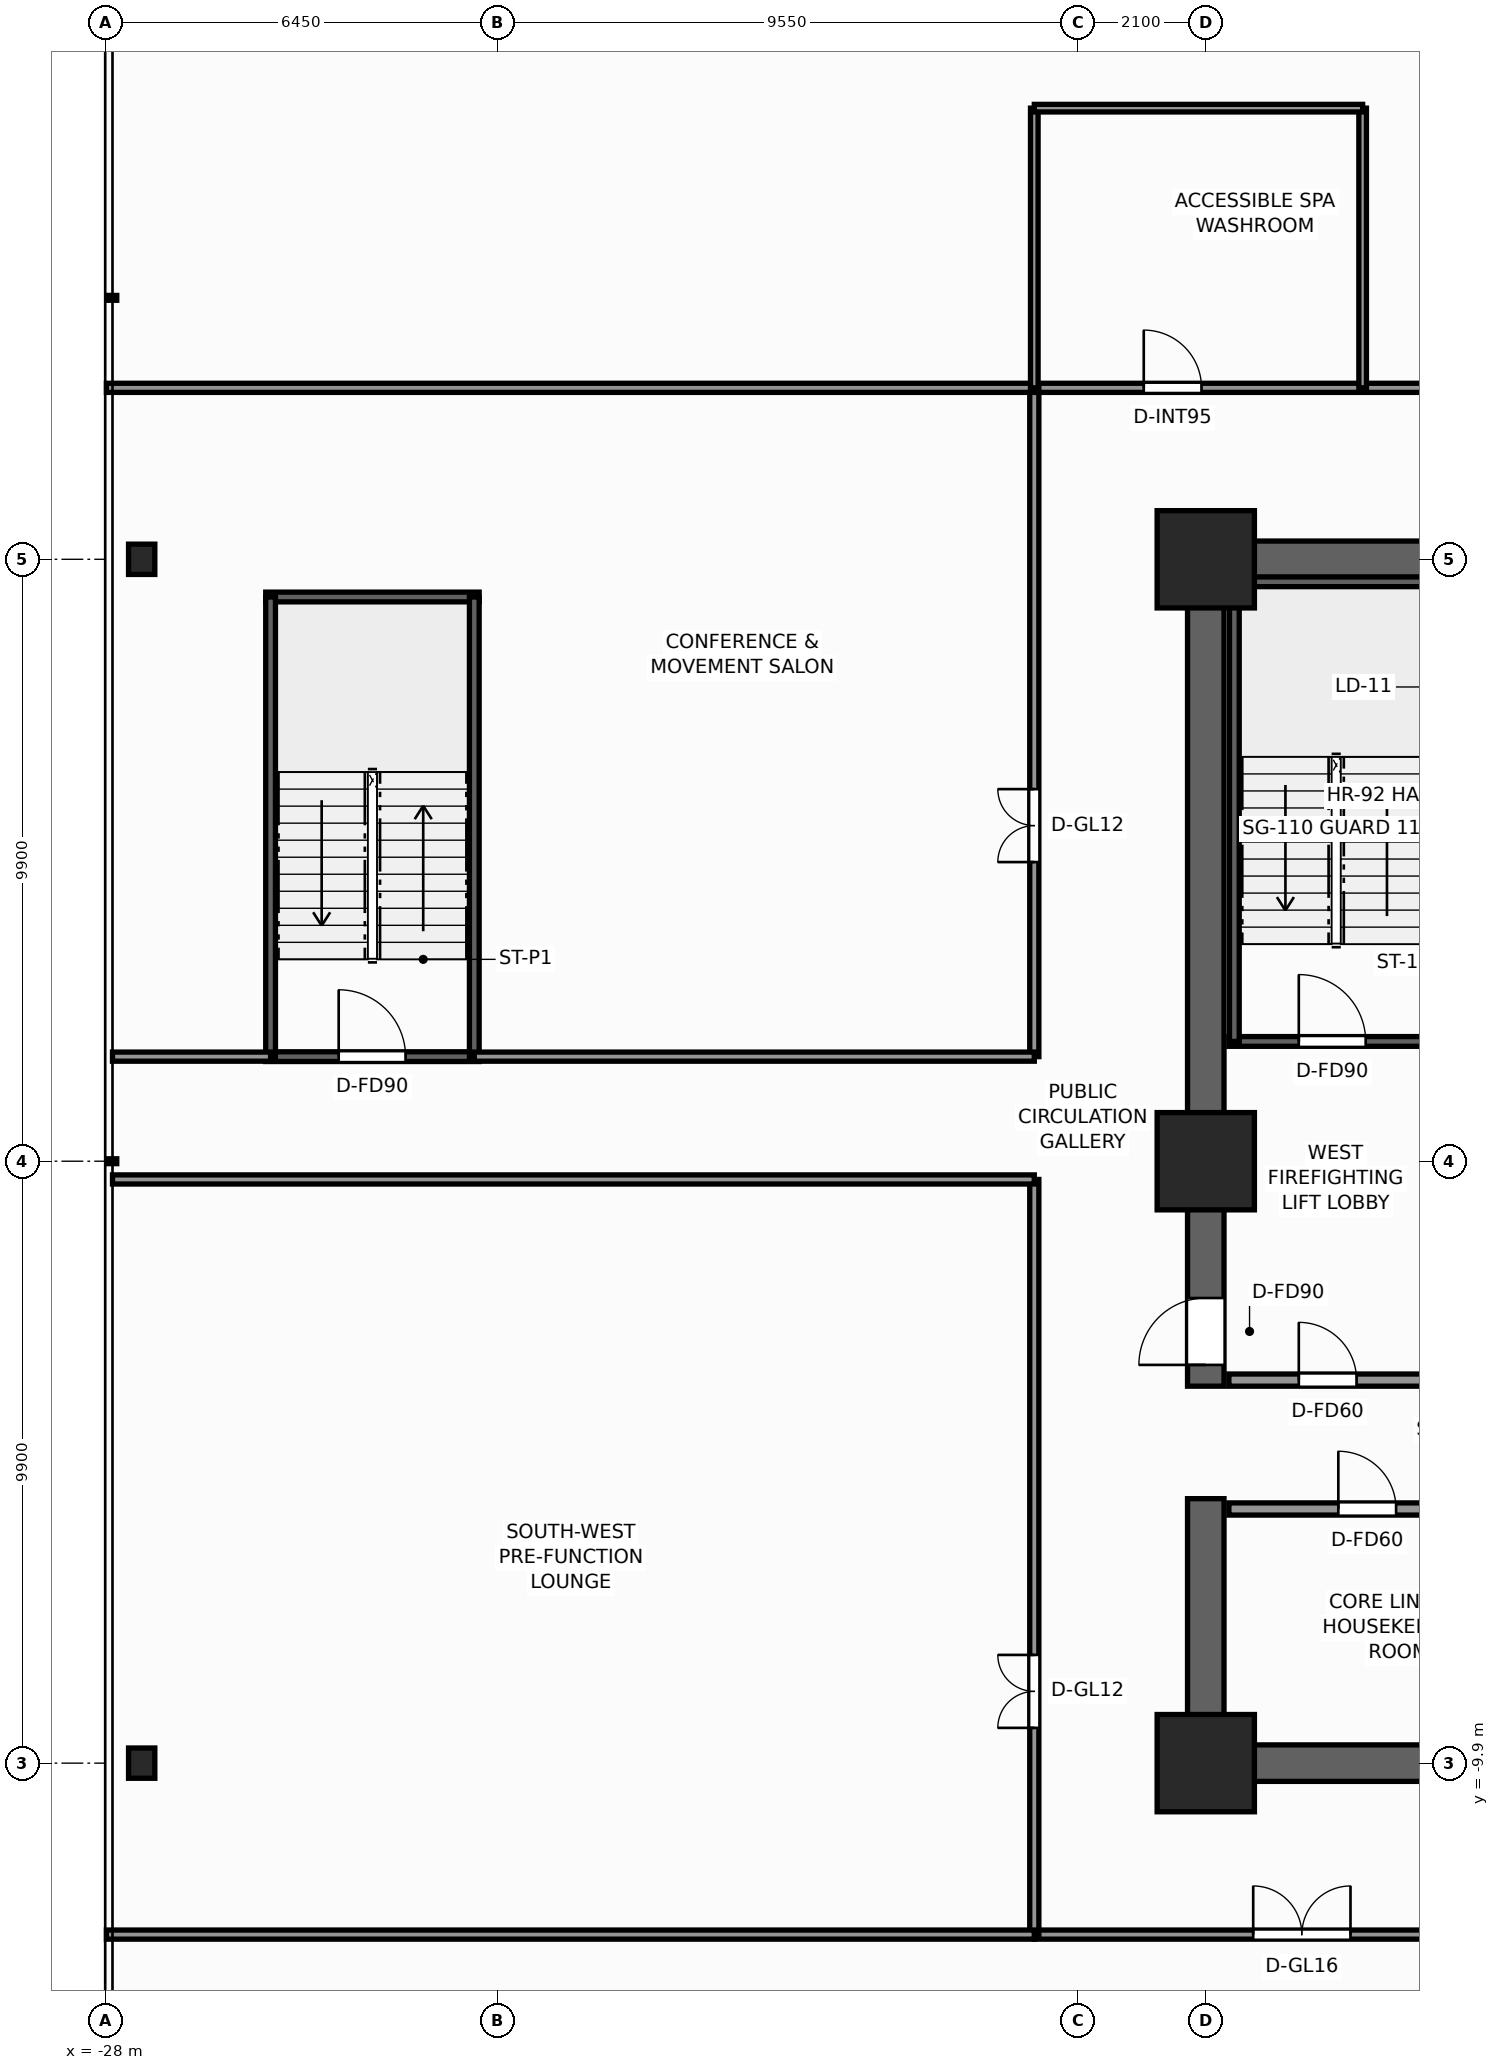
"""IFC4 building model, lengths in metres.
Left out: names, types, materials, properties, quantities, classifications, styles, units other than length and angle.
Written with IfcOpenShell. Run it as: python <this file> out.ifc"""

import sys

from ifc_helpers import new_model, si_unit, direction, frame, frame_2d, origin, origin_2d, place, context, subcontext, project, spatial, rectangle, i_section, extrude, element, fill, save


model = new_model("IFC4")
c1 = context("Model", 3, precision=1e-05, world=origin(), true_north=direction((0.0, 1.0)))
c2 = subcontext(c1, "Body", "Model", "MODEL_VIEW")
j1 = project(units=[si_unit("LENGTHUNIT", "METRE"), si_unit("PLANEANGLEUNIT", "RADIAN")], contexts=[c1])
p1 = place(None, origin())
s1 = spatial("IfcSite", under=j1, at=p1, CompositionType="ELEMENT")
p2 = place(p1, origin())
s2 = spatial("IfcBuilding", under=s1, at=p2, CompositionType="ELEMENT")
p3 = place(p2, frame((0.0, 0.0, 15.2)))
s3 = spatial("IfcBuildingStorey", under=s2, at=p3, CompositionType="ELEMENT", Elevation=15.2)
p4 = place(p3, frame((-3.54, -9.9, 0.0), z_axis=(0.0, 0.0, 1.0), x_axis=(-1.0, 0.0, 0.0)))
e1 = element("IfcWall", 1, at=p4, inside=s3, PredefinedType="SHEAR", context=c2, shape_type="SweptSolid", body=[
    extrude(rectangle(XDim=6.66, YDim=0.6, at=frame_2d((3.33, 0.0))), origin(), (0.0, 0.0, 1.0), 4.1),
])
p5 = place(p3, frame((-10.2, 9.9, 0.0), z_axis=(0.0, 0.0, 1.0), x_axis=(1.0, 0.0, 0.0)))
e2 = element("IfcWall", 2, at=p5, inside=s3, PredefinedType="SHEAR", context=c2, shape_type="SweptSolid", body=[
    extrude(rectangle(XDim=14.62, YDim=0.6, at=frame_2d((7.31, 0.0))), origin(), (0.0, 0.0, 1.0), 4.1),
])
p6 = place(p3, frame((-9.9, -9.6, 0.0), z_axis=(0.0, 0.0, 1.0), x_axis=(0.0, 1.0, 0.0)))
e3 = element("IfcWall", 3, at=p6, inside=s3, PredefinedType="SHEAR", context=c2, shape_type="SweptSolid", body=[
    extrude(rectangle(XDim=4.05, YDim=0.6, at=frame_2d((2.025, 0.0))), origin(), (0.0, 0.0, 1.0), 4.1),
])
p7 = place(p3, frame((-9.9, -3.7, 0.0), z_axis=(0.0, 0.0, 1.0), x_axis=(0.0, 1.0, 0.0)))
e4 = element("IfcWall", 4, at=p7, inside=s3, PredefinedType="SHEAR", context=c2, shape_type="SweptSolid", body=[
    extrude(rectangle(XDim=13.3, YDim=0.6, at=frame_2d((6.65, 0.0))), origin(), (0.0, 0.0, 1.0), 4.1),
])
p8 = place(p7, frame((0.35, 0.0, 0.0)))
e5 = element("IfcOpeningElement", 5, at=p8, cuts=e4, PredefinedType="OPENING", context=c2, shape_type="SweptSolid", body=[
    extrude(rectangle(XDim=1.1, YDim=2.2, at=frame_2d((0.55, 1.1))), frame((0.0, 0.31, 0.0), z_axis=(0.0, -1.0, 0.0), x_axis=(1.0, 0.0, 0.0)), (0.0, 0.0, 1.0), 0.62),
])
for number, where, z_axis, x_axis in (
    (6, (-9.9, -9.9, 0.0), (0.0, 0.0, 1.0), (1.0, 0.0, 0.0)),
    (7, (-9.9, 9.9, 0.0), (0.0, 0.0, 1.0), (1.0, 0.0, 0.0)),
    (8, (-9.9, 0.0, 0.0), (0.0, 0.0, 1.0), (1.0, 0.0, 0.0)),
):
    element("IfcColumn", number, at=place(p3, frame(where, z_axis=z_axis, x_axis=x_axis)), inside=s3, PredefinedType="COLUMN", context=c2, shape_type="SweptSolid", body=[
        extrude(rectangle(XDim=1.6, YDim=1.6, at=origin_2d()), origin(), (0.0, 0.0, 1.0), 4.1),
    ])
for number, where, z_axis, x_axis in (
    (9, (-27.4, -9.9, 0.0), (0.0, 0.0, 1.0), (1.0, 0.0, 0.0)),
    (10, (-27.4, 9.9, 0.0), (0.0, 0.0, 1.0), (1.0, 0.0, 0.0)),
):
    element("IfcColumn", number, at=place(p3, frame(where, z_axis=z_axis, x_axis=x_axis)), inside=s3, PredefinedType="COLUMN", context=c2, shape_type="SweptSolid", body=[
        extrude(i_section(OverallWidth=0.432, OverallDepth=0.498, WebThickness=0.056, FlangeThickness=0.089, FilletRadius=0.025, at=origin_2d()), origin(), (0.0, 0.0, 1.0), 4.1),
    ])
p9 = place(p3, frame((-9.52, 1.97, 0.0), z_axis=(0.0, 0.0, 1.0), x_axis=(1.0, 0.0, 0.0)))
e11 = element("IfcWall", 11, at=p9, inside=s3, PredefinedType="SHEAR", context=c2, shape_type="SweptSolid", body=[
    extrude(rectangle(XDim=3.52, YDim=0.16, at=frame_2d((1.76, 0.0))), origin(), (0.0, 0.0, 1.0), 4.1),
])
p10 = place(p9, frame((1.15, 0.0, 0.0)))
e12 = element("IfcOpeningElement", 12, at=p10, cuts=e11, PredefinedType="OPENING", context=c2, shape_type="SweptSolid", body=[
    extrude(rectangle(XDim=1.1, YDim=2.2, at=frame_2d((0.55, 1.1))), frame((0.0, 0.09, 0.0), z_axis=(0.0, -1.0, 0.0), x_axis=(1.0, 0.0, 0.0)), (0.0, 0.0, 1.0), 0.18),
])
p11 = place(p3, frame((-9.52, 9.53, 0.0), z_axis=(0.0, 0.0, 1.0), x_axis=(1.0, 0.0, 0.0)))
e13 = element("IfcWall", 13, at=p11, inside=s3, PredefinedType="SHEAR", context=c2, shape_type="SweptSolid", body=[
    extrude(rectangle(XDim=3.52, YDim=0.16, at=frame_2d((1.76, 0.0))), origin(), (0.0, 0.0, 1.0), 4.1),
])
p12 = place(p3, frame((-9.43, 1.97, 0.0), z_axis=(0.0, 0.0, 1.0), x_axis=(0.0, 1.0, 0.0)))
e14 = element("IfcWall", 14, at=p12, inside=s3, PredefinedType="SHEAR", context=c2, shape_type="SweptSolid", body=[
    extrude(rectangle(XDim=7.56, YDim=0.16, at=frame_2d((3.78, 0.0))), origin(), (0.0, 0.0, 1.0), 4.1),
])
p13 = place(p3, frame((-9.52, -3.6, 0.0), z_axis=(0.0, 0.0, 1.0), x_axis=(1.0, 0.0, 0.0)))
e15 = element("IfcWall", 15, at=p13, inside=s3, PredefinedType="SOLIDWALL", context=c2, shape_type="SweptSolid", body=[
    extrude(rectangle(XDim=3.77, YDim=0.2, at=frame_2d((1.885, 0.0))), origin(), (0.0, 0.0, 1.0), 3.7),
])
p14 = place(p13, frame((1.15, 0.0, 0.0)))
e16 = element("IfcOpeningElement", 16, at=p14, cuts=e15, PredefinedType="OPENING", context=c2, shape_type="SweptSolid", body=[
    extrude(rectangle(XDim=0.95, YDim=2.06, at=frame_2d((0.475, 1.03))), frame((0.0, 0.11, 0.0), z_axis=(0.0, -1.0, 0.0), x_axis=(1.0, 0.0, 0.0)), (0.0, 0.0, 1.0), 0.22),
])
p15 = place(p3, frame((-9.52, -5.72, 0.0), z_axis=(0.0, 0.0, 1.0), x_axis=(1.0, 0.0, 0.0)))
e17 = element("IfcWall", 17, at=p15, inside=s3, PredefinedType="SOLIDWALL", context=c2, shape_type="SweptSolid", body=[
    extrude(rectangle(XDim=5.66, YDim=0.2, at=frame_2d((2.83, 0.0))), origin(), (0.0, 0.0, 1.0), 3.7),
])
p16 = place(p15, frame((1.8, 0.0, 0.0)))
e18 = element("IfcOpeningElement", 18, at=p16, cuts=e17, PredefinedType="OPENING", context=c2, shape_type="SweptSolid", body=[
    extrude(rectangle(XDim=0.95, YDim=2.06, at=frame_2d((0.475, 1.03))), frame((0.0, 0.11, 0.0), z_axis=(0.0, -1.0, 0.0), x_axis=(1.0, 0.0, 0.0)), (0.0, 0.0, 1.0), 0.22),
])
p17 = place(p3, frame((-25.36, 1.72, 0.0), z_axis=(0.0, 0.0, 1.0), x_axis=(1.0, 0.0, 0.0)))
e19 = element("IfcWall", 19, at=p17, inside=s3, PredefinedType="SHEAR", context=c2, shape_type="SweptSolid", body=[
    extrude(rectangle(XDim=3.51, YDim=0.16, at=frame_2d((1.755, 0.0))), origin(), (0.0, 0.0, 1.0), 4.1),
])
p18 = place(p17, frame((1.2, 0.0, 0.0)))
e20 = element("IfcOpeningElement", 20, at=p18, cuts=e19, PredefinedType="OPENING", context=c2, shape_type="SweptSolid", body=[
    extrude(rectangle(XDim=1.1, YDim=2.2, at=frame_2d((0.55, 1.1))), frame((0.0, 0.09, 0.0), z_axis=(0.0, -1.0, 0.0), x_axis=(1.0, 0.0, 0.0)), (0.0, 0.0, 1.0), 0.18),
])
p19 = place(p3, frame((-25.36, 9.28, 0.0), z_axis=(0.0, 0.0, 1.0), x_axis=(1.0, 0.0, 0.0)))
e21 = element("IfcWall", 21, at=p19, inside=s3, PredefinedType="SHEAR", context=c2, shape_type="SweptSolid", body=[
    extrude(rectangle(XDim=3.51, YDim=0.16, at=frame_2d((1.755, 0.0))), origin(), (0.0, 0.0, 1.0), 4.1),
])
for number, where, z_axis, x_axis in (
    (22, (-25.28, 1.72, 0.0), (0.0, 0.0, 1.0), (0.0, 1.0, 0.0)),
    (23, (-21.93, 1.72, 0.0), (0.0, 0.0, 1.0), (0.0, 1.0, 0.0)),
):
    element("IfcWall", number, at=place(p3, frame(where, z_axis=z_axis, x_axis=x_axis)), inside=s3, PredefinedType="SHEAR", context=c2, shape_type="SweptSolid", body=[
        extrude(rectangle(XDim=7.56, YDim=0.16, at=frame_2d((3.78, 0.0))), origin(), (0.0, 0.0, 1.0), 4.1),
    ])
p20 = place(p3, frame((-12.72, -12.72, 0.0), z_axis=(0.0, 0.0, 1.0), x_axis=(1.0, 0.0, 0.0)))
e24 = element("IfcWall", 24, at=p20, inside=s3, PredefinedType="PARTITIONING", context=c2, shape_type="SweptSolid", body=[
    extrude(rectangle(XDim=25.44, YDim=0.15, at=frame_2d((12.72, 0.0))), origin(), (0.0, 0.0, 1.0), 2.674),
])
p21 = place(p20, frame((3.6, 0.0, 0.0)))
e25 = element("IfcOpeningElement", 25, at=p21, cuts=e24, PredefinedType="OPENING", context=c2, shape_type="SweptSolid", body=[
    extrude(rectangle(XDim=1.6, YDim=2.3, at=frame_2d((0.8, 1.15))), frame((0.0, 0.085, 0.0), z_axis=(0.0, -1.0, 0.0), x_axis=(1.0, 0.0, 0.0)), (0.0, 0.0, 1.0), 0.17),
])
p22 = place(p20, frame((20.27, 0.0, 0.0)))
e26 = element("IfcOpeningElement", 26, at=p22, cuts=e24, PredefinedType="OPENING", context=c2, shape_type="SweptSolid", body=[
    extrude(rectangle(XDim=1.2, YDim=2.2, at=frame_2d((0.6, 1.1))), frame((0.0, 0.085, 0.0), z_axis=(0.0, -1.0, 0.0), x_axis=(1.0, 0.0, 0.0)), (0.0, 0.0, 1.0), 0.17),
])
p23 = place(p3, frame((-12.72, 12.72, 0.0), z_axis=(0.0, 0.0, 1.0), x_axis=(1.0, 0.0, 0.0)))
e27 = element("IfcWall", 27, at=p23, inside=s3, PredefinedType="PARTITIONING", context=c2, shape_type="SweptSolid", body=[
    extrude(rectangle(XDim=25.44, YDim=0.15, at=frame_2d((12.72, 0.0))), origin(), (0.0, 0.0, 1.0), 2.674),
])
p24 = place(p23, frame((1.8, 0.0, 0.0)))
e28 = element("IfcOpeningElement", 28, at=p24, cuts=e27, PredefinedType="OPENING", context=c2, shape_type="SweptSolid", body=[
    extrude(rectangle(XDim=0.95, YDim=2.06, at=frame_2d((0.475, 1.03))), frame((0.0, 0.085, 0.0), z_axis=(0.0, -1.0, 0.0), x_axis=(1.0, 0.0, 0.0)), (0.0, 0.0, 1.0), 0.17),
])
p25 = place(p23, frame((10.5, 0.0, 0.0)))
e29 = element("IfcOpeningElement", 29, at=p25, cuts=e27, PredefinedType="OPENING", context=c2, shape_type="SweptSolid", body=[
    extrude(rectangle(XDim=1.6, YDim=2.3, at=frame_2d((0.8, 1.15))), frame((0.0, 0.085, 0.0), z_axis=(0.0, -1.0, 0.0), x_axis=(1.0, 0.0, 0.0)), (0.0, 0.0, 1.0), 0.17),
])
p26 = place(p3, frame((-12.72, -12.72, 0.0), z_axis=(0.0, 0.0, 1.0), x_axis=(0.0, 1.0, 0.0)))
e30 = element("IfcWall", 30, at=p26, inside=s3, PredefinedType="PARTITIONING", context=c2, shape_type="SweptSolid", body=[
    extrude(rectangle(XDim=12.42, YDim=0.15, at=frame_2d((6.21, 0.0))), origin(), (0.0, 0.0, 1.0), 2.674),
])
p27 = place(p26, frame((3.4, 0.0, 0.0)))
e31 = element("IfcOpeningElement", 31, at=p27, cuts=e30, PredefinedType="OPENING", context=c2, shape_type="SweptSolid", body=[
    extrude(rectangle(XDim=1.2, YDim=2.2, at=frame_2d((0.6, 1.1))), frame((0.0, 0.085, 0.0), z_axis=(0.0, -1.0, 0.0), x_axis=(1.0, 0.0, 0.0)), (0.0, 0.0, 1.0), 0.17),
])
p28 = place(p3, frame((-12.72, 1.72, 0.0), z_axis=(0.0, 0.0, 1.0), x_axis=(0.0, 1.0, 0.0)))
e32 = element("IfcWall", 32, at=p28, inside=s3, PredefinedType="PARTITIONING", context=c2, shape_type="SweptSolid", body=[
    extrude(rectangle(XDim=11.0, YDim=0.15, at=frame_2d((5.5, 0.0))), origin(), (0.0, 0.0, 1.0), 2.674),
])
p29 = place(p28, frame((3.2, 0.0, 0.0)))
e33 = element("IfcOpeningElement", 33, at=p29, cuts=e32, PredefinedType="OPENING", context=c2, shape_type="SweptSolid", body=[
    extrude(rectangle(XDim=1.2, YDim=2.2, at=frame_2d((0.6, 1.1))), frame((0.0, 0.085, 0.0), z_axis=(0.0, -1.0, 0.0), x_axis=(1.0, 0.0, 0.0)), (0.0, 0.0, 1.0), 0.17),
])
p30 = place(p3, frame((-27.88, -0.3, 0.0), z_axis=(0.0, 0.0, 1.0), x_axis=(1.0, 0.0, 0.0)))
e34 = element("IfcWall", 34, at=p30, inside=s3, PredefinedType="PARTITIONING", context=c2, shape_type="SweptSolid", body=[
    extrude(rectangle(XDim=15.16, YDim=0.15, at=frame_2d((7.58, 0.0))), origin(), (0.0, 0.0, 1.0), 3.069),
])
p31 = place(p3, frame((-27.88, 1.72, 0.0), z_axis=(0.0, 0.0, 1.0), x_axis=(1.0, 0.0, 0.0)))
e35 = element("IfcWall", 35, at=p31, inside=s3, PredefinedType="PARTITIONING", context=c2, shape_type="SweptSolid", body=[
    extrude(rectangle(XDim=2.6, YDim=0.15, at=frame_2d((1.3, 0.0))), origin(), (0.0, 0.0, 1.0), 3.069),
])
p32 = place(p3, frame((-21.93, 1.72, 0.0), z_axis=(0.0, 0.0, 1.0), x_axis=(1.0, 0.0, 0.0)))
e36 = element("IfcWall", 36, at=p32, inside=s3, PredefinedType="PARTITIONING", context=c2, shape_type="SweptSolid", body=[
    extrude(rectangle(XDim=9.21, YDim=0.15, at=frame_2d((4.605, 0.0))), origin(), (0.0, 0.0, 1.0), 3.7),
])
for number, where, z_axis, x_axis in (
    (37, (-27.98, -12.72, 0.0), (0.0, 0.0, 1.0), (1.0, 0.0, 0.0)),
    (38, (-27.98, 12.72, 0.0), (0.0, 0.0, 1.0), (1.0, 0.0, 0.0)),
):
    element("IfcWall", number, at=place(p3, frame(where, z_axis=z_axis, x_axis=x_axis)), inside=s3, PredefinedType="PARTITIONING", context=c2, shape_type="SweptSolid", body=[
        extrude(rectangle(XDim=15.26, YDim=0.15, at=frame_2d((7.63, 0.0))), origin(), (0.0, 0.0, 1.0), 3.069),
    ])
for number, where, z_axis, x_axis in (
    (39, (-12.72, 12.72, 0.0), (0.0, 0.0, 1.0), (0.0, 1.0, 0.0)),
    (40, (-7.32, 12.72, 0.0), (0.0, 0.0, 1.0), (0.0, 1.0, 0.0)),
):
    element("IfcWall", number, at=place(p3, frame(where, z_axis=z_axis, x_axis=x_axis)), inside=s3, PredefinedType="PARTITIONING", context=c2, shape_type="SweptSolid", body=[
        extrude(rectangle(XDim=4.6, YDim=0.125, at=frame_2d((2.3, 0.0))), origin(), (0.0, 0.0, 1.0), 3.7),
    ])
p33 = place(p3, frame((-12.72, 17.32, 0.0), z_axis=(0.0, 0.0, 1.0), x_axis=(1.0, 0.0, 0.0)))
e41 = element("IfcWall", 41, at=p33, inside=s3, PredefinedType="PARTITIONING", context=c2, shape_type="SweptSolid", body=[
    extrude(rectangle(XDim=5.4, YDim=0.125, at=frame_2d((2.7, 0.0))), origin(), (0.0, 0.0, 1.0), 2.674),
])
p34 = place(p10, origin())
e42 = element("IfcDoor", 42, at=p34, inside=s3, OperationType="SINGLE_SWING_LEFT", PredefinedType="DOOR", context=c2, shape_type="SweptSolid", body=[
    extrude(rectangle(XDim=1.1, YDim=2.2, at=frame_2d((0.55, 1.1))), frame((0.0, 0.025, 0.0), z_axis=(0.0, -1.0, 0.0), x_axis=(1.0, 0.0, 0.0)), (0.0, 0.0, 1.0), 0.05),
])
fill(e12, e42)
p35 = place(p8, origin())
e43 = element("IfcDoor", 43, at=p35, inside=s3, OperationType="SINGLE_SWING_LEFT", PredefinedType="DOOR", context=c2, shape_type="SweptSolid", body=[
    extrude(rectangle(XDim=1.1, YDim=2.2, at=frame_2d((0.55, 1.1))), frame((0.0, 0.025, 0.0), z_axis=(0.0, -1.0, 0.0), x_axis=(1.0, 0.0, 0.0)), (0.0, 0.0, 1.0), 0.05),
])
fill(e5, e43)
p36 = place(p16, origin())
e44 = element("IfcDoor", 44, at=p36, inside=s3, OperationType="SINGLE_SWING_LEFT", PredefinedType="DOOR", context=c2, shape_type="SweptSolid", body=[
    extrude(rectangle(XDim=0.95, YDim=2.06, at=frame_2d((0.475, 1.03))), frame((0.0, 0.025, 0.0), z_axis=(0.0, -1.0, 0.0), x_axis=(1.0, 0.0, 0.0)), (0.0, 0.0, 1.0), 0.05),
])
fill(e18, e44)
p37 = place(p14, origin())
e45 = element("IfcDoor", 45, at=p37, inside=s3, OperationType="SINGLE_SWING_LEFT", PredefinedType="DOOR", context=c2, shape_type="SweptSolid", body=[
    extrude(rectangle(XDim=0.95, YDim=2.06, at=frame_2d((0.475, 1.03))), frame((0.0, 0.025, 0.0), z_axis=(0.0, -1.0, 0.0), x_axis=(1.0, 0.0, 0.0)), (0.0, 0.0, 1.0), 0.05),
])
fill(e16, e45)
p38 = place(p18, origin())
e46 = element("IfcDoor", 46, at=p38, inside=s3, OperationType="SINGLE_SWING_LEFT", PredefinedType="DOOR", context=c2, shape_type="SweptSolid", body=[
    extrude(rectangle(XDim=1.1, YDim=2.2, at=frame_2d((0.55, 1.1))), frame((0.0, 0.025, 0.0), z_axis=(0.0, -1.0, 0.0), x_axis=(1.0, 0.0, 0.0)), (0.0, 0.0, 1.0), 0.05),
])
fill(e20, e46)
p39 = place(p21, origin())
e47 = element("IfcDoor", 47, at=p39, inside=s3, OperationType="DOUBLE_DOOR_SINGLE_SWING", PredefinedType="DOOR", context=c2, shape_type="SweptSolid", body=[
    extrude(rectangle(XDim=1.6, YDim=2.3, at=frame_2d((0.8, 1.15))), frame((0.0, 0.025, 0.0), z_axis=(0.0, -1.0, 0.0), x_axis=(1.0, 0.0, 0.0)), (0.0, 0.0, 1.0), 0.05),
])
fill(e25, e47)
p40 = place(p29, origin())
e48 = element("IfcDoor", 48, at=p40, inside=s3, OperationType="DOUBLE_DOOR_SINGLE_SWING", PredefinedType="DOOR", context=c2, shape_type="SweptSolid", body=[
    extrude(rectangle(XDim=1.2, YDim=2.2, at=frame_2d((0.6, 1.1))), frame((0.0, 0.025, 0.0), z_axis=(0.0, -1.0, 0.0), x_axis=(1.0, 0.0, 0.0)), (0.0, 0.0, 1.0), 0.05),
])
fill(e33, e48)
p41 = place(p24, origin())
e49 = element("IfcDoor", 49, at=p41, inside=s3, OperationType="SINGLE_SWING_LEFT", PredefinedType="DOOR", context=c2, shape_type="SweptSolid", body=[
    extrude(rectangle(XDim=0.95, YDim=2.06, at=frame_2d((0.475, 1.03))), frame((0.0, 0.025, 0.0), z_axis=(0.0, -1.0, 0.0), x_axis=(1.0, 0.0, 0.0)), (0.0, 0.0, 1.0), 0.05),
])
fill(e28, e49)
p42 = place(p27, origin())
e50 = element("IfcDoor", 50, at=p42, inside=s3, OperationType="DOUBLE_DOOR_SINGLE_SWING", PredefinedType="DOOR", context=c2, shape_type="SweptSolid", body=[
    extrude(rectangle(XDim=1.2, YDim=2.2, at=frame_2d((0.6, 1.1))), frame((0.0, 0.025, 0.0), z_axis=(0.0, -1.0, 0.0), x_axis=(1.0, 0.0, 0.0)), (0.0, 0.0, 1.0), 0.05),
])
fill(e31, e50)
save(model, sys.argv[1])
